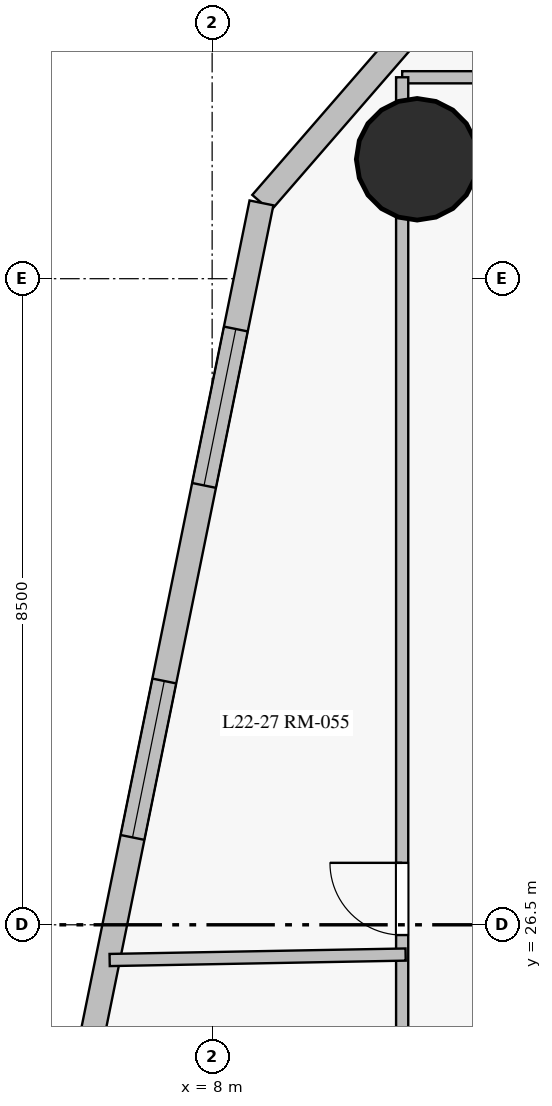
"""IFC4 building model, lengths in metres.
Left out: names, types, materials, properties, quantities, classifications, styles, units other than length and angle.
Written with IfcOpenShell. Run it as: python <this file> out.ifc"""

import sys

from ifc_helpers import new_model, si_unit, direction, frame, frame_2d, origin, origin_with_axes, origin_2d, place, context, subcontext, project, spatial, rectangle, circle, extrude, source, transform, mapped, element, fill, save


model = new_model("IFC4")
c1 = context("Model", 3, precision=1e-05, world=origin(), true_north=direction((0.0, 1.0)))
c2 = subcontext(c1, "Body", "Model", "MODEL_VIEW")
j1 = project(units=[si_unit("LENGTHUNIT", "METRE"), si_unit("PLANEANGLEUNIT", "RADIAN")], contexts=[c1])
p1 = place(None, origin())
s1 = spatial("IfcSite", under=j1, at=p1, CompositionType="ELEMENT")
p2 = place(p1, origin())
s2 = spatial("IfcBuilding", under=s1, at=p2, CompositionType="ELEMENT")
p3 = place(p2, frame((0.0, 0.0, 84.1)))
s3 = spatial("IfcBuildingStorey", under=s2, at=p3, CompositionType="ELEMENT", Elevation=84.1)
m1 = source(origin_with_axes(), c2, "Body", "SweptSolid", [
    extrude(circle(Radius=0.8, at=origin_2d()), origin(), (0.0, 0.0, 1.0), 3.6),
])
p4 = place(p3, frame((10.697, 36.571, 0.0), z_axis=(0.0, 0.0, 1.0), x_axis=(1.0, 0.0, 0.0)))
e1 = element("IfcColumn", 1, at=p4, inside=s3, PredefinedType="COLUMN", context=c2, shape_type="MappedRepresentation", body=[
    mapped(m1, transform((0.0, 0.0, 0.0), scale=1.0)),
])
p5 = place(p3, frame((16.307, 44.819, 0.0), z_axis=(0.0, 0.0, 1.0), x_axis=(-0.655537404489, -0.755162705194, 0.0)))
e2 = element("IfcWall", 2, at=p5, inside=s3, PredefinedType="SOLIDWALL", context=c2, shape_type="SweptSolid", body=[
    extrude(rectangle(XDim=11.682, YDim=0.32, at=frame_2d((5.841, 0.0))), origin(), (0.0, 0.0, 1.0), 3.325),
])
p6 = place(p5, frame((1.437, 0.0, 0.85)))
e3 = element("IfcOpeningElement", 3, at=p6, cuts=e2, PredefinedType="OPENING", context=c2, shape_type="SweptSolid", body=[
    extrude(rectangle(XDim=2.1, YDim=1.95, at=frame_2d((1.05, 0.975))), frame((0.0, 0.17, 0.0), z_axis=(0.0, -1.0, 0.0), x_axis=(1.0, 0.0, 0.0)), (0.0, 0.0, 1.0), 0.34),
])
p7 = place(p5, frame((5.65, 0.0, 0.85)))
e4 = element("IfcOpeningElement", 4, at=p7, cuts=e2, PredefinedType="OPENING", context=c2, shape_type="SweptSolid", body=[
    extrude(rectangle(XDim=2.1, YDim=1.95, at=frame_2d((1.05, 0.975))), frame((0.0, 0.17, 0.0), z_axis=(0.0, -1.0, 0.0), x_axis=(1.0, 0.0, 0.0)), (0.0, 0.0, 1.0), 0.34),
])
p8 = place(p3, frame((8.649, 35.997, 0.0), z_axis=(0.0, 0.0, 1.0), x_axis=(-0.199165339699, -0.979965901173, 0.0)))
e5 = element("IfcWall", 5, at=p8, inside=s3, PredefinedType="SOLIDWALL", context=c2, shape_type="SweptSolid", body=[
    extrude(rectangle(XDim=14.562, YDim=0.32, at=frame_2d((7.281, 0.0))), origin(), (0.0, 0.0, 1.0), 3.325),
])
p9 = place(p8, frame((1.693, 0.0, 0.85)))
e6 = element("IfcOpeningElement", 6, at=p9, cuts=e5, PredefinedType="OPENING", context=c2, shape_type="SweptSolid", body=[
    extrude(rectangle(XDim=2.1, YDim=1.95, at=frame_2d((1.05, 0.975))), frame((0.0, 0.17, 0.0), z_axis=(0.0, -1.0, 0.0), x_axis=(1.0, 0.0, 0.0)), (0.0, 0.0, 1.0), 0.34),
])
p10 = place(p8, frame((6.418, 0.0, 0.85)))
e7 = element("IfcOpeningElement", 7, at=p10, cuts=e5, PredefinedType="OPENING", context=c2, shape_type="SweptSolid", body=[
    extrude(rectangle(XDim=2.1, YDim=1.95, at=frame_2d((1.05, 0.975))), frame((0.0, 0.17, 0.0), z_axis=(0.0, -1.0, 0.0), x_axis=(1.0, 0.0, 0.0)), (0.0, 0.0, 1.0), 0.34),
])
p11 = place(p8, frame((11.276, 0.0, 0.85)))
e8 = element("IfcOpeningElement", 8, at=p11, cuts=e5, PredefinedType="OPENING", context=c2, shape_type="SweptSolid", body=[
    extrude(rectangle(XDim=2.1, YDim=1.95, at=frame_2d((1.05, 0.975))), frame((0.0, 0.17, 0.0), z_axis=(0.0, -1.0, 0.0), x_axis=(1.0, 0.0, 0.0)), (0.0, 0.0, 1.0), 0.34),
])
p12 = place(p3, frame((10.5, 37.65, 0.0), z_axis=(0.0, 0.0, 1.0), x_axis=(1.0, 0.0, 0.0)))
e9 = element("IfcWall", 9, at=p12, inside=s3, PredefinedType="PARTITIONING", context=c2, shape_type="SweptSolid", body=[
    extrude(rectangle(XDim=29.75, YDim=0.16, at=frame_2d((14.875, 0.0))), origin(), (0.0, 0.0, 1.0), 2.725),
])
p13 = place(p12, frame((27.918, 0.0, 0.0)))
e10 = element("IfcOpeningElement", 10, at=p13, cuts=e9, PredefinedType="OPENING", context=c2, shape_type="SweptSolid", body=[
    extrude(rectangle(XDim=0.95, YDim=2.15, at=frame_2d((0.475, 1.075))), frame((0.0, 0.09, 0.0), z_axis=(0.0, -1.0, 0.0), x_axis=(1.0, 0.0, 0.0)), (0.0, 0.0, 1.0), 0.18),
])
p14 = place(p12, frame((25.129, 0.0, 0.0)))
e11 = element("IfcOpeningElement", 11, at=p14, cuts=e9, PredefinedType="OPENING", context=c2, shape_type="SweptSolid", body=[
    extrude(rectangle(XDim=0.95, YDim=2.15, at=frame_2d((0.475, 1.075))), frame((0.0, 0.09, 0.0), z_axis=(0.0, -1.0, 0.0), x_axis=(1.0, 0.0, 0.0)), (0.0, 0.0, 1.0), 0.18),
])
p15 = place(p12, frame((21.748, 0.0, 0.0)))
e12 = element("IfcOpeningElement", 12, at=p15, cuts=e9, PredefinedType="OPENING", context=c2, shape_type="SweptSolid", body=[
    extrude(rectangle(XDim=0.86, YDim=2.1, at=frame_2d((0.43, 1.05))), frame((0.0, 0.09, 0.0), z_axis=(0.0, -1.0, 0.0), x_axis=(1.0, 0.0, 0.0)), (0.0, 0.0, 1.0), 0.18),
])
p16 = place(p12, frame((20.048, 0.0, 0.0)))
e13 = element("IfcOpeningElement", 13, at=p16, cuts=e9, PredefinedType="OPENING", context=c2, shape_type="SweptSolid", body=[
    extrude(rectangle(XDim=0.95, YDim=2.15, at=frame_2d((0.475, 1.075))), frame((0.0, 0.09, 0.0), z_axis=(0.0, -1.0, 0.0), x_axis=(1.0, 0.0, 0.0)), (0.0, 0.0, 1.0), 0.18),
])
p17 = place(p12, frame((17.722, 0.0, 0.0)))
e14 = element("IfcOpeningElement", 14, at=p17, cuts=e9, PredefinedType="OPENING", context=c2, shape_type="SweptSolid", body=[
    extrude(rectangle(XDim=0.95, YDim=2.15, at=frame_2d((0.475, 1.075))), frame((0.0, 0.09, 0.0), z_axis=(0.0, -1.0, 0.0), x_axis=(1.0, 0.0, 0.0)), (0.0, 0.0, 1.0), 0.18),
])
p18 = place(p12, frame((15.906, 0.0, 0.0)))
e15 = element("IfcOpeningElement", 15, at=p18, cuts=e9, PredefinedType="OPENING", context=c2, shape_type="SweptSolid", body=[
    extrude(rectangle(XDim=0.95, YDim=2.15, at=frame_2d((0.475, 1.075))), frame((0.0, 0.09, 0.0), z_axis=(0.0, -1.0, 0.0), x_axis=(1.0, 0.0, 0.0)), (0.0, 0.0, 1.0), 0.18),
])
p19 = place(p12, frame((12.735, 0.0, 0.0)))
e16 = element("IfcOpeningElement", 16, at=p19, cuts=e9, PredefinedType="OPENING", context=c2, shape_type="SweptSolid", body=[
    extrude(rectangle(XDim=0.95, YDim=2.15, at=frame_2d((0.475, 1.075))), frame((0.0, 0.09, 0.0), z_axis=(0.0, -1.0, 0.0), x_axis=(1.0, 0.0, 0.0)), (0.0, 0.0, 1.0), 0.18),
])
p20 = place(p12, frame((10.11, 0.0, 0.0)))
e17 = element("IfcOpeningElement", 17, at=p20, cuts=e9, PredefinedType="OPENING", context=c2, shape_type="SweptSolid", body=[
    extrude(rectangle(XDim=0.95, YDim=2.15, at=frame_2d((0.475, 1.075))), frame((0.0, 0.09, 0.0), z_axis=(0.0, -1.0, 0.0), x_axis=(1.0, 0.0, 0.0)), (0.0, 0.0, 1.0), 0.18),
])
p21 = place(p12, frame((8.99, 0.0, 0.0)))
e18 = element("IfcOpeningElement", 18, at=p21, cuts=e9, PredefinedType="OPENING", context=c2, shape_type="SweptSolid", body=[
    extrude(rectangle(XDim=0.95, YDim=2.15, at=frame_2d((0.475, 1.075))), frame((0.0, 0.09, 0.0), z_axis=(0.0, -1.0, 0.0), x_axis=(1.0, 0.0, 0.0)), (0.0, 0.0, 1.0), 0.18),
])
p22 = place(p12, frame((7.897, 0.0, 0.0)))
e19 = element("IfcOpeningElement", 19, at=p22, cuts=e9, PredefinedType="OPENING", context=c2, shape_type="SweptSolid", body=[
    extrude(rectangle(XDim=0.95, YDim=2.15, at=frame_2d((0.475, 1.075))), frame((0.0, 0.09, 0.0), z_axis=(0.0, -1.0, 0.0), x_axis=(1.0, 0.0, 0.0)), (0.0, 0.0, 1.0), 0.18),
])
p23 = place(p3, frame((10.5, 15.35, 0.0), z_axis=(0.0, 0.0, 1.0), x_axis=(0.0, 1.0, 0.0)))
e20 = element("IfcWall", 20, at=p23, inside=s3, PredefinedType="PARTITIONING", context=c2, shape_type="SweptSolid", body=[
    extrude(rectangle(XDim=22.3, YDim=0.16, at=frame_2d((11.15, 0.0))), origin(), (0.0, 0.0, 1.0), 2.725),
])
p24 = place(p23, frame((7.33, 0.0, 0.0)))
e21 = element("IfcOpeningElement", 21, at=p24, cuts=e20, PredefinedType="OPENING", context=c2, shape_type="SweptSolid", body=[
    extrude(rectangle(XDim=0.95, YDim=2.15, at=frame_2d((0.475, 1.075))), frame((0.0, 0.09, 0.0), z_axis=(0.0, -1.0, 0.0), x_axis=(1.0, 0.0, 0.0)), (0.0, 0.0, 1.0), 0.18),
])
p25 = place(p23, frame((11.015, 0.0, 0.0)))
e22 = element("IfcOpeningElement", 22, at=p25, cuts=e20, PredefinedType="OPENING", context=c2, shape_type="SweptSolid", body=[
    extrude(rectangle(XDim=0.95, YDim=2.15, at=frame_2d((0.475, 1.075))), frame((0.0, 0.09, 0.0), z_axis=(0.0, -1.0, 0.0), x_axis=(1.0, 0.0, 0.0)), (0.0, 0.0, 1.0), 0.18),
])
p26 = place(p3, frame((6.652, 26.037, 0.0), z_axis=(0.0, 0.0, 1.0), x_axis=(0.999830141578, 0.018430626473, 0.0)))
e23 = element("IfcWall", 23, at=p26, inside=s3, PredefinedType="PARTITIONING", context=c2, shape_type="SweptSolid", body=[
    extrude(rectangle(XDim=3.895, YDim=0.16, at=frame_2d((1.947, 0.0))), origin(), (0.0, 0.0, 1.0), 3.325),
])
m2 = source(origin_with_axes(), c2, "Body", "SweptSolid", [
    extrude(rectangle(XDim=2.1, YDim=1.95, at=frame_2d((1.05, 0.975))), frame((0.0, 0.03, 0.0), z_axis=(0.0, -1.0, 0.0), x_axis=(1.0, 0.0, 0.0)), (0.0, 0.0, 1.0), 0.06),
])
p27 = place(p9, origin())
e24 = element("IfcWindow", 24, at=p27, inside=s3, PartitioningType="SINGLE_PANEL", PredefinedType="WINDOW", context=c2, shape_type="MappedRepresentation", body=[
    mapped(m2, transform((0.0, 0.0, 0.0), scale=1.0)),
])
fill(e6, e24)
p28 = place(p10, origin())
e25 = element("IfcWindow", 25, at=p28, inside=s3, PartitioningType="SINGLE_PANEL", PredefinedType="WINDOW", context=c2, shape_type="MappedRepresentation", body=[
    mapped(m2, transform((0.0, 0.0, 0.0), scale=1.0)),
])
fill(e7, e25)
m3 = source(origin_with_axes(), c2, "Body", "SweptSolid", [
    extrude(rectangle(XDim=0.95, YDim=2.15, at=frame_2d((0.475, 1.075))), frame((0.0, 0.025, 0.0), z_axis=(0.0, -1.0, 0.0), x_axis=(1.0, 0.0, 0.0)), (0.0, 0.0, 1.0), 0.05),
])
p29 = place(p25, origin())
e26 = element("IfcDoor", 26, at=p29, inside=s3, OperationType="SINGLE_SWING_RIGHT", PredefinedType="DOOR", context=c2, shape_type="MappedRepresentation", body=[
    mapped(m3, transform((0.0, 0.0, 0.0), scale=1.0)),
])
fill(e22, e26)
save(model, sys.argv[1])
